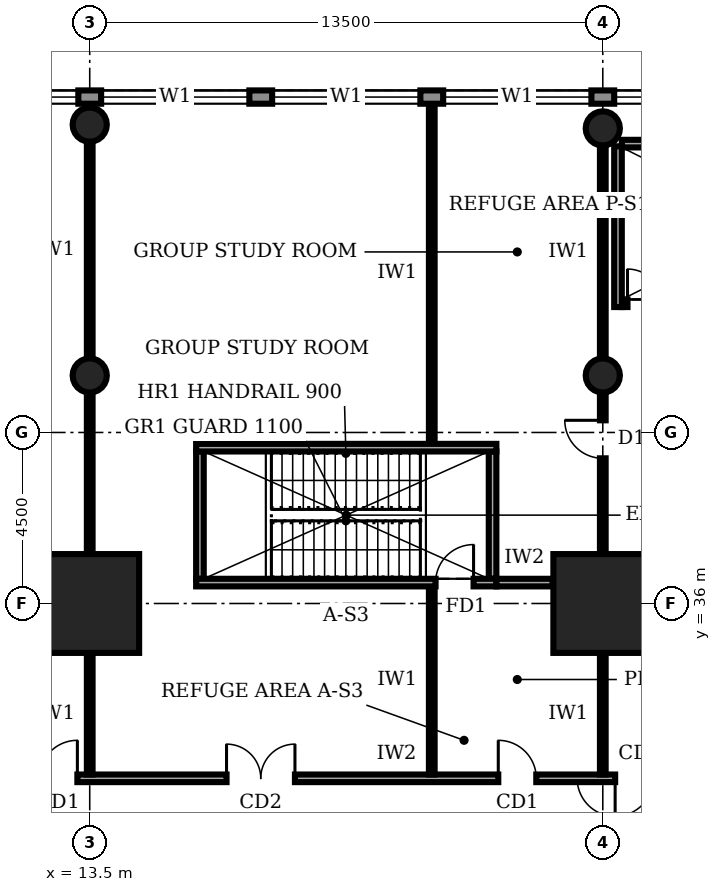
"""IFC4 building model, lengths in metres.
Left out: names, types, materials, properties, quantities, classifications, styles, units other than length and angle.
Written with IfcOpenShell. Run it as: python <this file> out.ifc"""

import sys

from ifc_helpers import new_model, si_unit, direction, frame, frame_2d, origin, origin_2d, place, context, subcontext, project, spatial, rectangle, circle, extrude, element, fill, save


model = new_model("IFC4")
c1 = context("Model", 3, precision=1e-05, world=origin(), true_north=direction((0.0, 1.0)))
c2 = subcontext(c1, "Body", "Model", "MODEL_VIEW")
j1 = project(units=[si_unit("LENGTHUNIT", "METRE"), si_unit("PLANEANGLEUNIT", "RADIAN")], contexts=[c1])
p1 = place(None, origin())
s1 = spatial("IfcSite", under=j1, at=p1, CompositionType="ELEMENT")
p2 = place(p1, origin())
s2 = spatial("IfcBuilding", under=s1, at=p2, CompositionType="ELEMENT")
p3 = place(p2, frame((0.0, 0.0, 11.0)))
s3 = spatial("IfcBuildingStorey", under=s2, at=p3, CompositionType="ELEMENT", Elevation=11.0)
for number, where, z_axis, x_axis in (
    (1, (13.5, 36.0, 0.0), (0.0, 0.0, 1.0), (1.0, 0.0, 0.0)),
    (2, (27.0, 36.0, 0.0), (0.0, 0.0, 1.0), (1.0, 0.0, 0.0)),
):
    element("IfcColumn", number, at=place(p3, frame(where, z_axis=z_axis, x_axis=x_axis)), inside=s3, PredefinedType="COLUMN", context=c2, shape_type="SweptSolid", body=[
        extrude(rectangle(XDim=2.6, YDim=2.6, at=origin_2d()), origin(), (0.0, 0.0, 1.0), 5.0),
    ])
for number, where, z_axis, x_axis in (
    (3, (13.5, 42.0, 0.0), (0.0, 0.0, 1.0), (1.0, 0.0, 0.0)),
    (4, (27.0, 42.0, 0.0), (0.0, 0.0, 1.0), (1.0, 0.0, 0.0)),
    (5, (13.5, 48.6, 0.0), (0.0, 0.0, 1.0), (1.0, 0.0, 0.0)),
    (6, (27.0, 48.5, 0.0), (0.0, 0.0, 1.0), (1.0, 0.0, 0.0)),
):
    element("IfcColumn", number, at=place(p3, frame(where, z_axis=z_axis, x_axis=x_axis)), inside=s3, PredefinedType="COLUMN", context=c2, shape_type="SweptSolid", body=[
        extrude(circle(Radius=0.45, at=origin_2d()), origin(), (0.0, 0.0, 1.0), 5.0),
    ])
p4 = place(p3, frame((98.98, 49.325, 0.0), z_axis=(0.0, 0.0, 1.0), x_axis=(-1.0, 0.0, 0.0)))
e7 = element("IfcWall", 7, at=p4, inside=s3, PredefinedType="STANDARD", context=c2, shape_type="SweptSolid", body=[
    extrude(rectangle(XDim=98.96, YDim=0.35, at=frame_2d((49.48, 0.0))), origin(), (0.0, 0.0, 1.0), 4.7),
])
p5 = place(p4, frame((94.71, 0.0, 0.9)))
e8 = element("IfcOpeningElement", 8, at=p5, cuts=e7, PredefinedType="OPENING", context=c2, shape_type="SweptSolid", body=[
    extrude(rectangle(XDim=3.9, YDim=2.2, at=frame_2d((1.95, 1.1))), frame((0.0, 0.185, 0.0), z_axis=(0.0, -1.0, 0.0), x_axis=(1.0, 0.0, 0.0)), (0.0, 0.0, 1.0), 0.37),
])
p6 = place(p4, frame((90.28, 0.0, 0.9)))
e9 = element("IfcOpeningElement", 9, at=p6, cuts=e7, PredefinedType="OPENING", context=c2, shape_type="SweptSolid", body=[
    extrude(rectangle(XDim=3.9, YDim=2.2, at=frame_2d((1.95, 1.1))), frame((0.0, 0.185, 0.0), z_axis=(0.0, -1.0, 0.0), x_axis=(1.0, 0.0, 0.0)), (0.0, 0.0, 1.0), 0.37),
])
p7 = place(p4, frame((85.78, 0.0, 0.9)))
e10 = element("IfcOpeningElement", 10, at=p7, cuts=e7, PredefinedType="OPENING", context=c2, shape_type="SweptSolid", body=[
    extrude(rectangle(XDim=3.9, YDim=2.2, at=frame_2d((1.95, 1.1))), frame((0.0, 0.185, 0.0), z_axis=(0.0, -1.0, 0.0), x_axis=(1.0, 0.0, 0.0)), (0.0, 0.0, 1.0), 0.37),
])
p8 = place(p4, frame((81.28, 0.0, 0.9)))
e11 = element("IfcOpeningElement", 11, at=p8, cuts=e7, PredefinedType="OPENING", context=c2, shape_type="SweptSolid", body=[
    extrude(rectangle(XDim=3.9, YDim=2.2, at=frame_2d((1.95, 1.1))), frame((0.0, 0.185, 0.0), z_axis=(0.0, -1.0, 0.0), x_axis=(1.0, 0.0, 0.0)), (0.0, 0.0, 1.0), 0.37),
])
p9 = place(p4, frame((76.78, 0.0, 0.9)))
e12 = element("IfcOpeningElement", 12, at=p9, cuts=e7, PredefinedType="OPENING", context=c2, shape_type="SweptSolid", body=[
    extrude(rectangle(XDim=3.9, YDim=2.2, at=frame_2d((1.95, 1.1))), frame((0.0, 0.185, 0.0), z_axis=(0.0, -1.0, 0.0), x_axis=(1.0, 0.0, 0.0)), (0.0, 0.0, 1.0), 0.37),
])
p10 = place(p4, frame((72.28, 0.0, 0.9)))
e13 = element("IfcOpeningElement", 13, at=p10, cuts=e7, PredefinedType="OPENING", context=c2, shape_type="SweptSolid", body=[
    extrude(rectangle(XDim=3.9, YDim=2.2, at=frame_2d((1.95, 1.1))), frame((0.0, 0.185, 0.0), z_axis=(0.0, -1.0, 0.0), x_axis=(1.0, 0.0, 0.0)), (0.0, 0.0, 1.0), 0.37),
])
p11 = place(p4, frame((67.78, 0.0, 0.9)))
e14 = element("IfcOpeningElement", 14, at=p11, cuts=e7, PredefinedType="OPENING", context=c2, shape_type="SweptSolid", body=[
    extrude(rectangle(XDim=3.9, YDim=2.2, at=frame_2d((1.95, 1.1))), frame((0.0, 0.185, 0.0), z_axis=(0.0, -1.0, 0.0), x_axis=(1.0, 0.0, 0.0)), (0.0, 0.0, 1.0), 0.37),
])
p12 = place(p4, frame((63.28, 0.0, 0.9)))
e15 = element("IfcOpeningElement", 15, at=p12, cuts=e7, PredefinedType="OPENING", context=c2, shape_type="SweptSolid", body=[
    extrude(rectangle(XDim=3.9, YDim=2.2, at=frame_2d((1.95, 1.1))), frame((0.0, 0.185, 0.0), z_axis=(0.0, -1.0, 0.0), x_axis=(1.0, 0.0, 0.0)), (0.0, 0.0, 1.0), 0.37),
])
p13 = place(p4, frame((58.78, 0.0, 0.9)))
e16 = element("IfcOpeningElement", 16, at=p13, cuts=e7, PredefinedType="OPENING", context=c2, shape_type="SweptSolid", body=[
    extrude(rectangle(XDim=3.9, YDim=2.2, at=frame_2d((1.95, 1.1))), frame((0.0, 0.185, 0.0), z_axis=(0.0, -1.0, 0.0), x_axis=(1.0, 0.0, 0.0)), (0.0, 0.0, 1.0), 0.37),
])
p14 = place(p4, frame((54.28, 0.0, 0.9)))
e17 = element("IfcOpeningElement", 17, at=p14, cuts=e7, PredefinedType="OPENING", context=c2, shape_type="SweptSolid", body=[
    extrude(rectangle(XDim=3.9, YDim=2.2, at=frame_2d((1.95, 1.1))), frame((0.0, 0.185, 0.0), z_axis=(0.0, -1.0, 0.0), x_axis=(1.0, 0.0, 0.0)), (0.0, 0.0, 1.0), 0.37),
])
p15 = place(p4, frame((49.78, 0.0, 0.9)))
e18 = element("IfcOpeningElement", 18, at=p15, cuts=e7, PredefinedType="OPENING", context=c2, shape_type="SweptSolid", body=[
    extrude(rectangle(XDim=3.9, YDim=2.2, at=frame_2d((1.95, 1.1))), frame((0.0, 0.185, 0.0), z_axis=(0.0, -1.0, 0.0), x_axis=(1.0, 0.0, 0.0)), (0.0, 0.0, 1.0), 0.37),
])
p16 = place(p4, frame((45.28, 0.0, 0.9)))
e19 = element("IfcOpeningElement", 19, at=p16, cuts=e7, PredefinedType="OPENING", context=c2, shape_type="SweptSolid", body=[
    extrude(rectangle(XDim=3.9, YDim=2.2, at=frame_2d((1.95, 1.1))), frame((0.0, 0.185, 0.0), z_axis=(0.0, -1.0, 0.0), x_axis=(1.0, 0.0, 0.0)), (0.0, 0.0, 1.0), 0.37),
])
p17 = place(p4, frame((40.78, 0.0, 0.9)))
e20 = element("IfcOpeningElement", 20, at=p17, cuts=e7, PredefinedType="OPENING", context=c2, shape_type="SweptSolid", body=[
    extrude(rectangle(XDim=3.9, YDim=2.2, at=frame_2d((1.95, 1.1))), frame((0.0, 0.185, 0.0), z_axis=(0.0, -1.0, 0.0), x_axis=(1.0, 0.0, 0.0)), (0.0, 0.0, 1.0), 0.37),
])
p18 = place(p4, frame((36.28, 0.0, 0.9)))
e21 = element("IfcOpeningElement", 21, at=p18, cuts=e7, PredefinedType="OPENING", context=c2, shape_type="SweptSolid", body=[
    extrude(rectangle(XDim=3.9, YDim=2.2, at=frame_2d((1.95, 1.1))), frame((0.0, 0.185, 0.0), z_axis=(0.0, -1.0, 0.0), x_axis=(1.0, 0.0, 0.0)), (0.0, 0.0, 1.0), 0.37),
])
p19 = place(p4, frame((31.78, 0.0, 0.9)))
e22 = element("IfcOpeningElement", 22, at=p19, cuts=e7, PredefinedType="OPENING", context=c2, shape_type="SweptSolid", body=[
    extrude(rectangle(XDim=3.9, YDim=2.2, at=frame_2d((1.95, 1.1))), frame((0.0, 0.185, 0.0), z_axis=(0.0, -1.0, 0.0), x_axis=(1.0, 0.0, 0.0)), (0.0, 0.0, 1.0), 0.37),
])
p20 = place(p4, frame((27.28, 0.0, 0.9)))
e23 = element("IfcOpeningElement", 23, at=p20, cuts=e7, PredefinedType="OPENING", context=c2, shape_type="SweptSolid", body=[
    extrude(rectangle(XDim=3.9, YDim=2.2, at=frame_2d((1.95, 1.1))), frame((0.0, 0.185, 0.0), z_axis=(0.0, -1.0, 0.0), x_axis=(1.0, 0.0, 0.0)), (0.0, 0.0, 1.0), 0.37),
])
p21 = place(p4, frame((22.78, 0.0, 0.9)))
e24 = element("IfcOpeningElement", 24, at=p21, cuts=e7, PredefinedType="OPENING", context=c2, shape_type="SweptSolid", body=[
    extrude(rectangle(XDim=3.9, YDim=2.2, at=frame_2d((1.95, 1.1))), frame((0.0, 0.185, 0.0), z_axis=(0.0, -1.0, 0.0), x_axis=(1.0, 0.0, 0.0)), (0.0, 0.0, 1.0), 0.37),
])
p22 = place(p4, frame((18.28, 0.0, 0.9)))
e25 = element("IfcOpeningElement", 25, at=p22, cuts=e7, PredefinedType="OPENING", context=c2, shape_type="SweptSolid", body=[
    extrude(rectangle(XDim=3.9, YDim=2.2, at=frame_2d((1.95, 1.1))), frame((0.0, 0.185, 0.0), z_axis=(0.0, -1.0, 0.0), x_axis=(1.0, 0.0, 0.0)), (0.0, 0.0, 1.0), 0.37),
])
p23 = place(p4, frame((13.78, 0.0, 0.9)))
e26 = element("IfcOpeningElement", 26, at=p23, cuts=e7, PredefinedType="OPENING", context=c2, shape_type="SweptSolid", body=[
    extrude(rectangle(XDim=3.9, YDim=2.2, at=frame_2d((1.95, 1.1))), frame((0.0, 0.185, 0.0), z_axis=(0.0, -1.0, 0.0), x_axis=(1.0, 0.0, 0.0)), (0.0, 0.0, 1.0), 0.37),
])
p24 = place(p4, frame((9.28, 0.0, 0.9)))
e27 = element("IfcOpeningElement", 27, at=p24, cuts=e7, PredefinedType="OPENING", context=c2, shape_type="SweptSolid", body=[
    extrude(rectangle(XDim=3.9, YDim=2.2, at=frame_2d((1.95, 1.1))), frame((0.0, 0.185, 0.0), z_axis=(0.0, -1.0, 0.0), x_axis=(1.0, 0.0, 0.0)), (0.0, 0.0, 1.0), 0.37),
])
p25 = place(p4, frame((4.78, 0.0, 0.9)))
e28 = element("IfcOpeningElement", 28, at=p25, cuts=e7, PredefinedType="OPENING", context=c2, shape_type="SweptSolid", body=[
    extrude(rectangle(XDim=3.9, YDim=2.2, at=frame_2d((1.95, 1.1))), frame((0.0, 0.185, 0.0), z_axis=(0.0, -1.0, 0.0), x_axis=(1.0, 0.0, 0.0)), (0.0, 0.0, 1.0), 0.37),
])
p26 = place(p3, frame((28.6, 31.4, 0.0), z_axis=(0.0, 0.0, 1.0), x_axis=(-1.0, 0.0, 0.0)))
e29 = element("IfcWall", 29, at=p26, inside=s3, PredefinedType="SOLIDWALL", context=c2, shape_type="SweptSolid", body=[
    extrude(rectangle(XDim=16.9, YDim=0.2, at=frame_2d((8.45, 0.0))), origin(), (0.0, 0.0, 1.0), 4.7),
])
p27 = place(p26, frame((15.425, 0.0, 0.0)))
e30 = element("IfcOpeningElement", 30, at=p27, cuts=e29, PredefinedType="OPENING", context=c2, shape_type="SweptSolid", body=[
    extrude(rectangle(XDim=1.0, YDim=2.1, at=frame_2d((0.5, 1.05))), frame((0.0, 0.11, 0.0), z_axis=(0.0, -1.0, 0.0), x_axis=(1.0, 0.0, 0.0)), (0.0, 0.0, 1.0), 0.22),
])
p28 = place(p26, frame((9.7, 0.0, 0.0)))
e31 = element("IfcOpeningElement", 31, at=p28, cuts=e29, PredefinedType="OPENING", context=c2, shape_type="SweptSolid", body=[
    extrude(rectangle(XDim=1.8, YDim=2.1, at=frame_2d((0.9, 1.05))), frame((0.0, 0.11, 0.0), z_axis=(0.0, -1.0, 0.0), x_axis=(1.0, 0.0, 0.0)), (0.0, 0.0, 1.0), 0.22),
])
p29 = place(p26, frame((3.35, 0.0, 0.0)))
e32 = element("IfcOpeningElement", 32, at=p29, cuts=e29, PredefinedType="OPENING", context=c2, shape_type="SweptSolid", body=[
    extrude(rectangle(XDim=1.0, YDim=2.1, at=frame_2d((0.5, 1.05))), frame((0.0, 0.11, 0.0), z_axis=(0.0, -1.0, 0.0), x_axis=(1.0, 0.0, 0.0)), (0.0, 0.0, 1.0), 0.22),
])
p30 = place(p26, frame((0.275, 0.0, 0.0)))
e33 = element("IfcOpeningElement", 33, at=p30, cuts=e29, PredefinedType="OPENING", context=c2, shape_type="SweptSolid", body=[
    extrude(rectangle(XDim=1.0, YDim=2.1, at=frame_2d((0.5, 1.05))), frame((0.0, 0.11, 0.0), z_axis=(0.0, -1.0, 0.0), x_axis=(1.0, 0.0, 0.0)), (0.0, 0.0, 1.0), 0.22),
])
p31 = place(p3, frame((13.5, 31.5, 0.0), z_axis=(0.0, 0.0, 1.0), x_axis=(0.0, 1.0, 0.0)))
e34 = element("IfcWall", 34, at=p31, inside=s3, PredefinedType="PARTITIONING", context=c2, shape_type="SweptSolid", body=[
    extrude(rectangle(XDim=3.18, YDim=0.15, at=frame_2d((1.59, 0.0))), origin(), (0.0, 0.0, 1.0), 3.8),
])
p32 = place(p3, frame((13.5, 37.32, 0.0), z_axis=(0.0, 0.0, 1.0), x_axis=(0.0, 1.0, 0.0)))
e35 = element("IfcWall", 35, at=p32, inside=s3, PredefinedType="PARTITIONING", context=c2, shape_type="SweptSolid", body=[
    extrude(rectangle(XDim=4.21, YDim=0.15, at=frame_2d((2.105, 0.0))), origin(), (0.0, 0.0, 1.0), 3.7),
])
p33 = place(p3, frame((13.5, 42.47, 0.0), z_axis=(0.0, 0.0, 1.0), x_axis=(0.0, 1.0, 0.0)))
e36 = element("IfcWall", 36, at=p33, inside=s3, PredefinedType="PARTITIONING", context=c2, shape_type="SweptSolid", body=[
    extrude(rectangle(XDim=5.66, YDim=0.15, at=frame_2d((2.83, 0.0))), origin(), (0.0, 0.0, 1.0), 3.7),
])
p34 = place(p3, frame((22.5, 31.5, 0.0), z_axis=(0.0, 0.0, 1.0), x_axis=(0.0, 1.0, 0.0)))
e37 = element("IfcWall", 37, at=p34, inside=s3, PredefinedType="PARTITIONING", context=c2, shape_type="SweptSolid", body=[
    extrude(rectangle(XDim=4.95, YDim=0.15, at=frame_2d((2.475, 0.0))), origin(), (0.0, 0.0, 1.0), 4.7),
])
p35 = place(p3, frame((22.5, 40.2, 0.0), z_axis=(0.0, 0.0, 1.0), x_axis=(0.0, 1.0, 0.0)))
e38 = element("IfcWall", 38, at=p35, inside=s3, PredefinedType="PARTITIONING", context=c2, shape_type="SweptSolid", body=[
    extrude(rectangle(XDim=9.0, YDim=0.15, at=frame_2d((4.5, 0.0))), origin(), (0.0, 0.0, 1.0), 4.7),
])
p36 = place(p3, frame((27.0, 31.5, 0.0), z_axis=(0.0, 0.0, 1.0), x_axis=(0.0, 1.0, 0.0)))
e39 = element("IfcWall", 39, at=p36, inside=s3, PredefinedType="PARTITIONING", context=c2, shape_type="SweptSolid", body=[
    extrude(rectangle(XDim=3.18, YDim=0.15, at=frame_2d((1.59, 0.0))), origin(), (0.0, 0.0, 1.0), 3.8),
])
p37 = place(p3, frame((27.0, 37.32, 0.0), z_axis=(0.0, 0.0, 1.0), x_axis=(0.0, 1.0, 0.0)))
e40 = element("IfcWall", 40, at=p37, inside=s3, PredefinedType="PARTITIONING", context=c2, shape_type="SweptSolid", body=[
    extrude(rectangle(XDim=4.21, YDim=0.15, at=frame_2d((2.105, 0.0))), origin(), (0.0, 0.0, 1.0), 3.7),
])
p38 = place(p37, frame((2.5, 0.0, 0.0)))
e41 = element("IfcOpeningElement", 41, at=p38, cuts=e40, PredefinedType="OPENING", context=c2, shape_type="SweptSolid", body=[
    extrude(rectangle(XDim=1.0, YDim=2.1, at=frame_2d((0.5, 1.05))), frame((0.0, 0.085, 0.0), z_axis=(0.0, -1.0, 0.0), x_axis=(1.0, 0.0, 0.0)), (0.0, 0.0, 1.0), 0.17),
])
p39 = place(p3, frame((27.0, 42.47, 0.0), z_axis=(0.0, 0.0, 1.0), x_axis=(0.0, 1.0, 0.0)))
e42 = element("IfcWall", 42, at=p39, inside=s3, PredefinedType="PARTITIONING", context=c2, shape_type="SweptSolid", body=[
    extrude(rectangle(XDim=5.56, YDim=0.15, at=frame_2d((2.78, 0.0))), origin(), (0.0, 0.0, 1.0), 3.7),
])
p40 = place(p3, frame((27.5, 43.9, 0.0), z_axis=(0.0, 0.0, 1.0), x_axis=(1.0, 0.0, 0.0)))
e43 = element("IfcWall", 43, at=p40, inside=s3, PredefinedType="SOLIDWALL", context=c2, shape_type="SweptSolid", body=[
    extrude(rectangle(XDim=8.0, YDim=0.2, at=frame_2d((4.0, 0.0))), origin(), (0.0, 0.0, 1.0), 4.7),
])
p41 = place(p40, frame((0.15, 0.0, 0.0)))
e44 = element("IfcOpeningElement", 44, at=p41, cuts=e43, PredefinedType="OPENING", context=c2, shape_type="SweptSolid", body=[
    extrude(rectangle(XDim=1.8, YDim=2.1, at=frame_2d((0.9, 1.05))), frame((0.0, 0.11, 0.0), z_axis=(0.0, -1.0, 0.0), x_axis=(1.0, 0.0, 0.0)), (0.0, 0.0, 1.0), 0.22),
])
p42 = place(p3, frame((27.5, 48.1, 0.0), z_axis=(0.0, 0.0, 1.0), x_axis=(1.0, 0.0, 0.0)))
e45 = element("IfcWall", 45, at=p42, inside=s3, PredefinedType="SOLIDWALL", context=c2, shape_type="SweptSolid", body=[
    extrude(rectangle(XDim=8.0, YDim=0.2, at=frame_2d((4.0, 0.0))), origin(), (0.0, 0.0, 1.0), 4.7),
])
p43 = place(p3, frame((27.4, 43.8, 0.0), z_axis=(0.0, 0.0, 1.0), x_axis=(0.0, 1.0, 0.0)))
e46 = element("IfcWall", 46, at=p43, inside=s3, PredefinedType="SOLIDWALL", context=c2, shape_type="SweptSolid", body=[
    extrude(rectangle(XDim=4.23, YDim=0.2, at=frame_2d((2.115, 0.0))), origin(), (0.0, 0.0, 1.0), 4.7),
])
p44 = place(p3, frame((24.2, 36.55, 0.0), z_axis=(0.0, 0.0, 1.0), x_axis=(1.0, 0.0, 0.0)))
e47 = element("IfcWall", 47, at=p44, inside=s3, PredefinedType="SOLIDWALL", context=c2, shape_type="SweptSolid", body=[
    extrude(rectangle(XDim=1.48, YDim=0.2, at=frame_2d((0.74, 0.0))), origin(), (0.0, 0.0, 1.0), 4.7),
])
p45 = place(p3, frame((16.3, 36.55, 0.0), z_axis=(0.0, 0.0, 1.0), x_axis=(1.0, 0.0, 0.0)))
e48 = element("IfcWall", 48, at=p45, inside=s3, PredefinedType="SOLIDWALL", context=c2, shape_type="SweptSolid", body=[
    extrude(rectangle(XDim=7.9, YDim=0.2, at=frame_2d((3.95, 0.0))), origin(), (0.0, 0.0, 1.0), 4.7),
])
p46 = place(p45, frame((6.3, 0.0, 0.0)))
e49 = element("IfcOpeningElement", 49, at=p46, cuts=e48, PredefinedType="OPENING", context=c2, shape_type="SweptSolid", body=[
    extrude(rectangle(XDim=1.0, YDim=2.1, at=frame_2d((0.5, 1.05))), frame((0.0, 0.11, 0.0), z_axis=(0.0, -1.0, 0.0), x_axis=(1.0, 0.0, 0.0)), (0.0, 0.0, 1.0), 0.22),
])
p47 = place(p3, frame((16.3, 40.1, 0.0), z_axis=(0.0, 0.0, 1.0), x_axis=(1.0, 0.0, 0.0)))
e50 = element("IfcWall", 50, at=p47, inside=s3, PredefinedType="SOLIDWALL", context=c2, shape_type="SweptSolid", body=[
    extrude(rectangle(XDim=7.9, YDim=0.2, at=frame_2d((3.95, 0.0))), origin(), (0.0, 0.0, 1.0), 4.7),
])
for number, where, z_axis, x_axis in (
    (51, (16.4, 36.65, 0.0), (0.0, 0.0, 1.0), (0.0, 1.0, 0.0)),
    (52, (24.1, 36.65, 0.0), (0.0, 0.0, 1.0), (0.0, 1.0, 0.0)),
):
    element("IfcWall", number, at=place(p3, frame(where, z_axis=z_axis, x_axis=x_axis)), inside=s3, PredefinedType="SOLIDWALL", context=c2, shape_type="SweptSolid", body=[
        extrude(rectangle(XDim=3.35, YDim=0.2, at=frame_2d((1.675, 0.0))), origin(), (0.0, 0.0, 1.0), 4.7),
    ])
p48 = place(p7, origin())
e53 = element("IfcWindow", 53, at=p48, inside=s3, PartitioningType="SINGLE_PANEL", PredefinedType="WINDOW", context=c2, shape_type="SweptSolid", body=[
    extrude(rectangle(XDim=3.9, YDim=2.2, at=frame_2d((1.95, 1.1))), frame((0.0, 0.03, 0.0), z_axis=(0.0, -1.0, 0.0), x_axis=(1.0, 0.0, 0.0)), (0.0, 0.0, 1.0), 0.06),
])
fill(e10, e53)
p49 = place(p8, origin())
e54 = element("IfcWindow", 54, at=p49, inside=s3, PartitioningType="SINGLE_PANEL", PredefinedType="WINDOW", context=c2, shape_type="SweptSolid", body=[
    extrude(rectangle(XDim=3.9, YDim=2.2, at=frame_2d((1.95, 1.1))), frame((0.0, 0.03, 0.0), z_axis=(0.0, -1.0, 0.0), x_axis=(1.0, 0.0, 0.0)), (0.0, 0.0, 1.0), 0.06),
])
fill(e11, e54)
p50 = place(p9, origin())
e55 = element("IfcWindow", 55, at=p50, inside=s3, PartitioningType="SINGLE_PANEL", PredefinedType="WINDOW", context=c2, shape_type="SweptSolid", body=[
    extrude(rectangle(XDim=3.9, YDim=2.2, at=frame_2d((1.95, 1.1))), frame((0.0, 0.03, 0.0), z_axis=(0.0, -1.0, 0.0), x_axis=(1.0, 0.0, 0.0)), (0.0, 0.0, 1.0), 0.06),
])
fill(e12, e55)
p51 = place(p10, origin())
e56 = element("IfcWindow", 56, at=p51, inside=s3, PartitioningType="SINGLE_PANEL", PredefinedType="WINDOW", context=c2, shape_type="SweptSolid", body=[
    extrude(rectangle(XDim=3.9, YDim=2.2, at=frame_2d((1.95, 1.1))), frame((0.0, 0.03, 0.0), z_axis=(0.0, -1.0, 0.0), x_axis=(1.0, 0.0, 0.0)), (0.0, 0.0, 1.0), 0.06),
])
fill(e13, e56)
p52 = place(p11, origin())
e57 = element("IfcWindow", 57, at=p52, inside=s3, PartitioningType="SINGLE_PANEL", PredefinedType="WINDOW", context=c2, shape_type="SweptSolid", body=[
    extrude(rectangle(XDim=3.9, YDim=2.2, at=frame_2d((1.95, 1.1))), frame((0.0, 0.03, 0.0), z_axis=(0.0, -1.0, 0.0), x_axis=(1.0, 0.0, 0.0)), (0.0, 0.0, 1.0), 0.06),
])
fill(e14, e57)
p53 = place(p27, frame((1.0, 0.0, 0.0), z_axis=(0.0, 0.0, 1.0), x_axis=(-1.0, 0.0, 0.0)))
e58 = element("IfcDoor", 58, at=p53, inside=s3, OperationType="SINGLE_SWING_RIGHT", PredefinedType="DOOR", context=c2, shape_type="SweptSolid", body=[
    extrude(rectangle(XDim=1.0, YDim=2.1, at=frame_2d((0.5, 1.05))), frame((0.0, 0.025, 0.0), z_axis=(0.0, -1.0, 0.0), x_axis=(1.0, 0.0, 0.0)), (0.0, 0.0, 1.0), 0.05),
])
fill(e30, e58)
p54 = place(p28, frame((1.8, 0.0, 0.0), z_axis=(0.0, 0.0, 1.0), x_axis=(-1.0, 0.0, 0.0)))
e59 = element("IfcDoor", 59, at=p54, inside=s3, OperationType="DOUBLE_DOOR_SINGLE_SWING", PredefinedType="DOOR", context=c2, shape_type="SweptSolid", body=[
    extrude(rectangle(XDim=1.8, YDim=2.1, at=frame_2d((0.9, 1.05))), frame((0.0, 0.025, 0.0), z_axis=(0.0, -1.0, 0.0), x_axis=(1.0, 0.0, 0.0)), (0.0, 0.0, 1.0), 0.05),
])
fill(e31, e59)
p55 = place(p29, frame((1.0, 0.0, 0.0), z_axis=(0.0, 0.0, 1.0), x_axis=(-1.0, 0.0, 0.0)))
e60 = element("IfcDoor", 60, at=p55, inside=s3, OperationType="SINGLE_SWING_LEFT", PredefinedType="DOOR", context=c2, shape_type="SweptSolid", body=[
    extrude(rectangle(XDim=1.0, YDim=2.1, at=frame_2d((0.5, 1.05))), frame((0.0, 0.025, 0.0), z_axis=(0.0, -1.0, 0.0), x_axis=(1.0, 0.0, 0.0)), (0.0, 0.0, 1.0), 0.05),
])
fill(e32, e60)
p56 = place(p30, origin())
e61 = element("IfcDoor", 61, at=p56, inside=s3, OperationType="SINGLE_SWING_RIGHT", PredefinedType="DOOR", context=c2, shape_type="SweptSolid", body=[
    extrude(rectangle(XDim=1.0, YDim=2.1, at=frame_2d((0.5, 1.05))), frame((0.0, 0.025, 0.0), z_axis=(0.0, -1.0, 0.0), x_axis=(1.0, 0.0, 0.0)), (0.0, 0.0, 1.0), 0.05),
])
fill(e33, e61)
p57 = place(p38, origin())
e62 = element("IfcDoor", 62, at=p57, inside=s3, OperationType="SINGLE_SWING_RIGHT", PredefinedType="DOOR", context=c2, shape_type="SweptSolid", body=[
    extrude(rectangle(XDim=1.0, YDim=2.1, at=frame_2d((0.5, 1.05))), frame((0.0, 0.025, 0.0), z_axis=(0.0, -1.0, 0.0), x_axis=(1.0, 0.0, 0.0)), (0.0, 0.0, 1.0), 0.05),
])
fill(e41, e62)
p58 = place(p41, origin())
e63 = element("IfcDoor", 63, at=p58, inside=s3, OperationType="DOUBLE_DOOR_SINGLE_SWING", PredefinedType="DOOR", context=c2, shape_type="SweptSolid", body=[
    extrude(rectangle(XDim=1.8, YDim=2.1, at=frame_2d((0.9, 1.05))), frame((0.0, 0.025, 0.0), z_axis=(0.0, -1.0, 0.0), x_axis=(1.0, 0.0, 0.0)), (0.0, 0.0, 1.0), 0.05),
])
fill(e44, e63)
p59 = place(p46, origin())
e64 = element("IfcDoor", 64, at=p59, inside=s3, OperationType="SINGLE_SWING_RIGHT", PredefinedType="DOOR", context=c2, shape_type="SweptSolid", body=[
    extrude(rectangle(XDim=1.0, YDim=2.1, at=frame_2d((0.5, 1.05))), frame((0.0, 0.025, 0.0), z_axis=(0.0, -1.0, 0.0), x_axis=(1.0, 0.0, 0.0)), (0.0, 0.0, 1.0), 0.05),
])
fill(e49, e64)
save(model, sys.argv[1])
